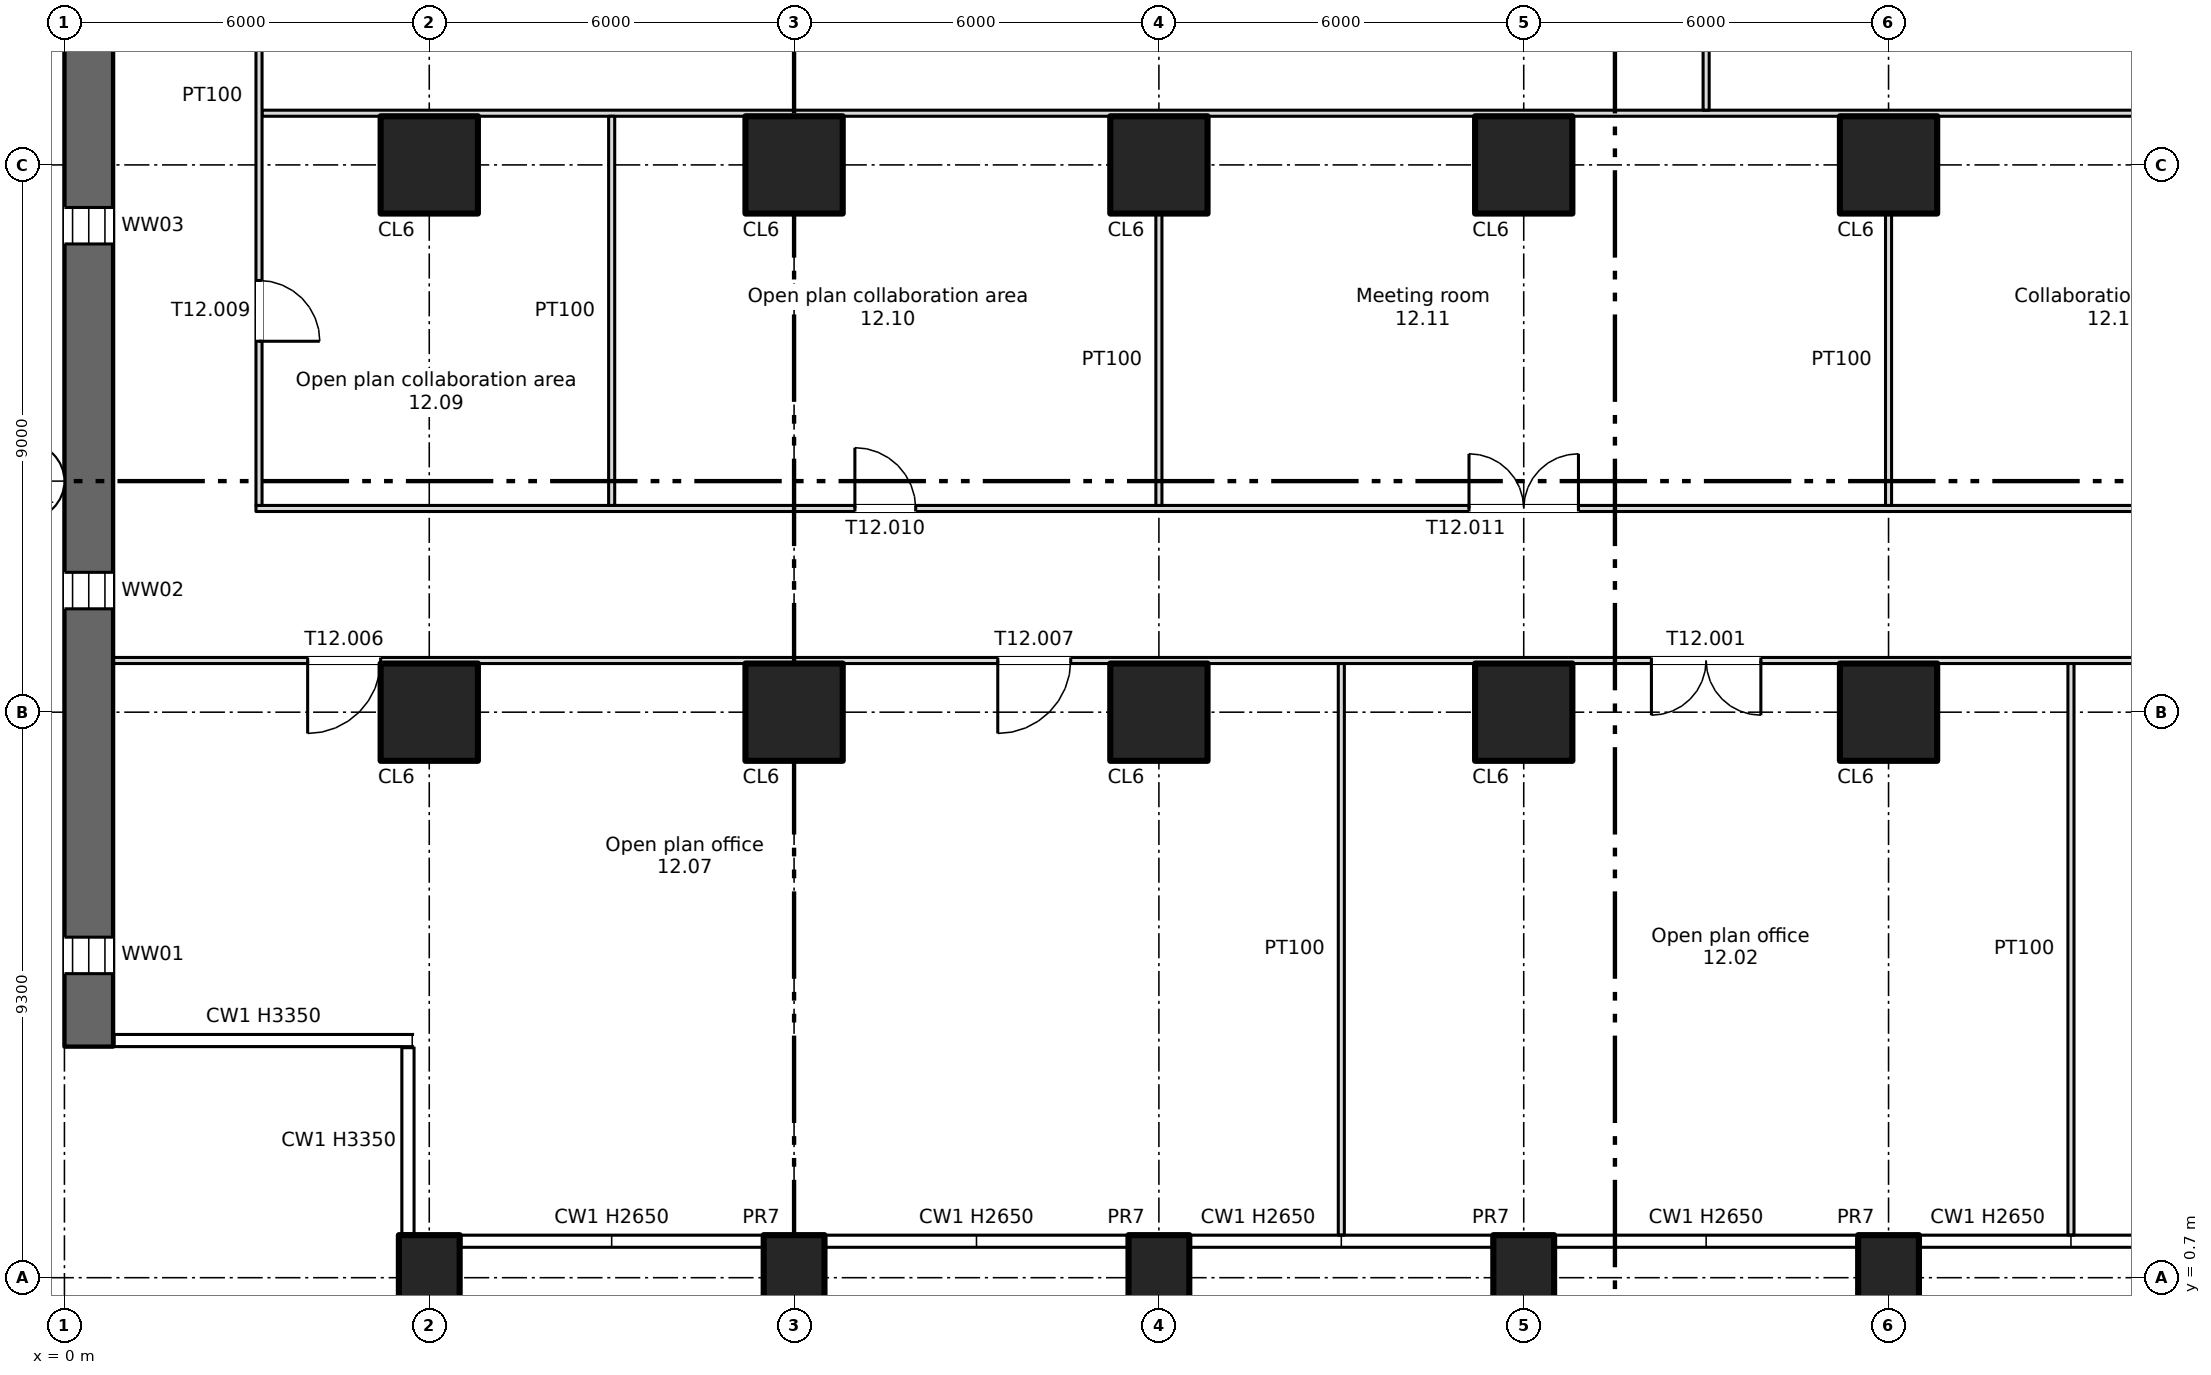
"""IFC4 building model, lengths in metres.
Left out: names, types, materials, properties, quantities, classifications, styles, units other than length and angle.
Written with IfcOpenShell. Run it as: python <this file> out.ifc"""

import sys

from ifc_helpers import new_model, si_unit, direction, frame, frame_2d, origin, origin_2d, place, context, subcontext, project, spatial, rectangle, extrude, element, fill, save


model = new_model("IFC4")
c1 = context("Model", 3, precision=1e-05, world=origin(), true_north=direction((0.0, 1.0)))
c2 = subcontext(c1, "Body", "Model", "MODEL_VIEW")
j1 = project(units=[si_unit("LENGTHUNIT", "METRE"), si_unit("PLANEANGLEUNIT", "RADIAN")], contexts=[c1])
p1 = place(None, origin())
s1 = spatial("IfcSite", under=j1, at=p1, CompositionType="ELEMENT")
p2 = place(p1, origin())
s2 = spatial("IfcBuilding", under=s1, at=p2, CompositionType="ELEMENT")
p3 = place(p2, frame((0.0, 0.0, 63.75)))
s3 = spatial("IfcBuildingStorey", under=s2, at=p3, CompositionType="ELEMENT", Elevation=63.75)
for number, where, z_axis, x_axis in (
    (1, (6.0, 0.7, -0.4), (0.0, 0.0, 1.0), (1.0, 0.0, 0.0)),
    (2, (12.0, 0.7, -0.4), (0.0, 0.0, 1.0), (1.0, 0.0, 0.0)),
    (3, (18.0, 0.7, -0.4), (0.0, 0.0, 1.0), (1.0, 0.0, 0.0)),
    (4, (24.0, 0.7, -0.4), (0.0, 0.0, 1.0), (1.0, 0.0, 0.0)),
    (5, (30.0, 0.7, -0.4), (0.0, 0.0, 1.0), (1.0, 0.0, 0.0)),
):
    element("IfcColumn", number, at=place(p3, frame(where, z_axis=z_axis, x_axis=x_axis)), inside=s3, PredefinedType="COLUMN", context=c2, shape_type="SweptSolid", body=[
        extrude(rectangle(XDim=1.0, YDim=1.4, at=origin_2d()), origin(), (0.0, 0.0, 1.0), 3.75),
    ])
for number, where, z_axis, x_axis in (
    (6, (6.0, 10.0, 0.0), (0.0, 0.0, 1.0), (1.0, 0.0, 0.0)),
    (7, (6.0, 19.0, 0.0), (0.0, 0.0, 1.0), (1.0, 0.0, 0.0)),
    (8, (12.0, 10.0, 0.0), (0.0, 0.0, 1.0), (1.0, 0.0, 0.0)),
    (9, (12.0, 19.0, 0.0), (0.0, 0.0, 1.0), (1.0, 0.0, 0.0)),
    (10, (18.0, 10.0, 0.0), (0.0, 0.0, 1.0), (1.0, 0.0, 0.0)),
    (11, (18.0, 19.0, 0.0), (0.0, 0.0, 1.0), (1.0, 0.0, 0.0)),
    (12, (24.0, 10.0, 0.0), (0.0, 0.0, 1.0), (1.0, 0.0, 0.0)),
    (13, (24.0, 19.0, 0.0), (0.0, 0.0, 1.0), (1.0, 0.0, 0.0)),
    (14, (30.0, 10.0, 0.0), (0.0, 0.0, 1.0), (1.0, 0.0, 0.0)),
    (15, (30.0, 19.0, 0.0), (0.0, 0.0, 1.0), (1.0, 0.0, 0.0)),
):
    element("IfcColumn", number, at=place(p3, frame(where, z_axis=z_axis, x_axis=x_axis)), inside=s3, PredefinedType="COLUMN", context=c2, shape_type="SweptSolid", body=[
        extrude(rectangle(XDim=1.6, YDim=1.6, at=origin_2d()), origin(), (0.0, 0.0, 1.0), 3.35),
    ])
p4 = place(p3, frame((0.4, 4.5, 0.0), z_axis=(0.0, 0.0, 1.0), x_axis=(0.0, 1.0, 0.0)))
e16 = element("IfcWall", 16, at=p4, inside=s3, PredefinedType="SHEAR", context=c2, shape_type="SweptSolid", body=[
    extrude(rectangle(XDim=37.0, YDim=0.8, at=frame_2d((18.5, 0.0))), origin(), (0.0, 0.0, 1.0), 3.35),
])
p5 = place(p4, frame((1.2, 0.0, 0.6)))
e17 = element("IfcOpeningElement", 17, at=p5, cuts=e16, PredefinedType="OPENING", context=c2, shape_type="SweptSolid", body=[
    extrude(rectangle(XDim=0.6, YDim=2.4, at=frame_2d((0.3, 1.2))), frame((0.0, 0.41, 0.0), z_axis=(0.0, -1.0, 0.0), x_axis=(1.0, 0.0, 0.0)), (0.0, 0.0, 1.0), 0.82),
])
p6 = place(p4, frame((7.2, 0.0, 0.6)))
e18 = element("IfcOpeningElement", 18, at=p6, cuts=e16, PredefinedType="OPENING", context=c2, shape_type="SweptSolid", body=[
    extrude(rectangle(XDim=0.6, YDim=2.4, at=frame_2d((0.3, 1.2))), frame((0.0, 0.41, 0.0), z_axis=(0.0, -1.0, 0.0), x_axis=(1.0, 0.0, 0.0)), (0.0, 0.0, 1.0), 0.82),
])
p7 = place(p4, frame((13.2, 0.0, 0.6)))
e19 = element("IfcOpeningElement", 19, at=p7, cuts=e16, PredefinedType="OPENING", context=c2, shape_type="SweptSolid", body=[
    extrude(rectangle(XDim=0.6, YDim=2.4, at=frame_2d((0.3, 1.2))), frame((0.0, 0.41, 0.0), z_axis=(0.0, -1.0, 0.0), x_axis=(1.0, 0.0, 0.0)), (0.0, 0.0, 1.0), 0.82),
])
p8 = place(p4, frame((19.2, 0.0, 0.6)))
e20 = element("IfcOpeningElement", 20, at=p8, cuts=e16, PredefinedType="OPENING", context=c2, shape_type="SweptSolid", body=[
    extrude(rectangle(XDim=0.6, YDim=2.4, at=frame_2d((0.3, 1.2))), frame((0.0, 0.41, 0.0), z_axis=(0.0, -1.0, 0.0), x_axis=(1.0, 0.0, 0.0)), (0.0, 0.0, 1.0), 0.82),
])
p9 = place(p4, frame((25.2, 0.0, 0.6)))
e21 = element("IfcOpeningElement", 21, at=p9, cuts=e16, PredefinedType="OPENING", context=c2, shape_type="SweptSolid", body=[
    extrude(rectangle(XDim=0.6, YDim=2.4, at=frame_2d((0.3, 1.2))), frame((0.0, 0.41, 0.0), z_axis=(0.0, -1.0, 0.0), x_axis=(1.0, 0.0, 0.0)), (0.0, 0.0, 1.0), 0.82),
])
p10 = place(p4, frame((31.2, 0.0, 0.6)))
e22 = element("IfcOpeningElement", 22, at=p10, cuts=e16, PredefinedType="OPENING", context=c2, shape_type="SweptSolid", body=[
    extrude(rectangle(XDim=0.6, YDim=2.4, at=frame_2d((0.3, 1.2))), frame((0.0, 0.41, 0.0), z_axis=(0.0, -1.0, 0.0), x_axis=(1.0, 0.0, 0.0)), (0.0, 0.0, 1.0), 0.82),
])
p11 = place(p3, frame((0.8, 10.85, 0.0), z_axis=(0.0, 0.0, 1.0), x_axis=(1.0, 0.0, 0.0)))
e23 = element("IfcWall", 23, at=p11, inside=s3, PredefinedType="PARTITIONING", context=c2, shape_type="SweptSolid", body=[
    extrude(rectangle(XDim=76.4, YDim=0.1, at=frame_2d((38.2, 0.0))), origin(), (0.0, 0.0, 1.0), 3.35),
])
p12 = place(p11, frame((25.3, 0.0, 0.0)))
e24 = element("IfcOpeningElement", 24, at=p12, cuts=e23, PredefinedType="OPENING", context=c2, shape_type="SweptSolid", body=[
    extrude(rectangle(XDim=1.8, YDim=2.1, at=frame_2d((0.9, 1.05))), frame((0.0, 0.06, 0.0), z_axis=(0.0, -1.0, 0.0), x_axis=(1.0, 0.0, 0.0)), (0.0, 0.0, 1.0), 0.12),
])
p13 = place(p11, frame((37.3, 0.0, 0.0)))
e25 = element("IfcOpeningElement", 25, at=p13, cuts=e23, PredefinedType="OPENING", context=c2, shape_type="SweptSolid", body=[
    extrude(rectangle(XDim=1.8, YDim=2.1, at=frame_2d((0.9, 1.05))), frame((0.0, 0.06, 0.0), z_axis=(0.0, -1.0, 0.0), x_axis=(1.0, 0.0, 0.0)), (0.0, 0.0, 1.0), 0.12),
])
p14 = place(p11, frame((48.2, 0.0, 0.0)))
e26 = element("IfcOpeningElement", 26, at=p14, cuts=e23, PredefinedType="OPENING", context=c2, shape_type="SweptSolid", body=[
    extrude(rectangle(XDim=1.0, YDim=2.1, at=frame_2d((0.5, 1.05))), frame((0.0, 0.06, 0.0), z_axis=(0.0, -1.0, 0.0), x_axis=(1.0, 0.0, 0.0)), (0.0, 0.0, 1.0), 0.12),
])
p15 = place(p11, frame((54.2, 0.0, 0.0)))
e27 = element("IfcOpeningElement", 27, at=p15, cuts=e23, PredefinedType="OPENING", context=c2, shape_type="SweptSolid", body=[
    extrude(rectangle(XDim=1.0, YDim=2.1, at=frame_2d((0.5, 1.05))), frame((0.0, 0.06, 0.0), z_axis=(0.0, -1.0, 0.0), x_axis=(1.0, 0.0, 0.0)), (0.0, 0.0, 1.0), 0.12),
])
p16 = place(p11, frame((61.3, 0.0, 0.0)))
e28 = element("IfcOpeningElement", 28, at=p16, cuts=e23, PredefinedType="OPENING", context=c2, shape_type="SweptSolid", body=[
    extrude(rectangle(XDim=1.8, YDim=2.1, at=frame_2d((0.9, 1.05))), frame((0.0, 0.06, 0.0), z_axis=(0.0, -1.0, 0.0), x_axis=(1.0, 0.0, 0.0)), (0.0, 0.0, 1.0), 0.12),
])
p17 = place(p11, frame((3.2, 0.0, 0.0)))
e29 = element("IfcOpeningElement", 29, at=p17, cuts=e23, PredefinedType="OPENING", context=c2, shape_type="SweptSolid", body=[
    extrude(rectangle(XDim=1.2, YDim=2.1, at=frame_2d((0.6, 1.05))), frame((0.0, 0.06, 0.0), z_axis=(0.0, -1.0, 0.0), x_axis=(1.0, 0.0, 0.0)), (0.0, 0.0, 1.0), 0.12),
])
p18 = place(p11, frame((14.55, 0.0, 0.0)))
e30 = element("IfcOpeningElement", 30, at=p18, cuts=e23, PredefinedType="OPENING", context=c2, shape_type="SweptSolid", body=[
    extrude(rectangle(XDim=1.2, YDim=2.1, at=frame_2d((0.6, 1.05))), frame((0.0, 0.06, 0.0), z_axis=(0.0, -1.0, 0.0), x_axis=(1.0, 0.0, 0.0)), (0.0, 0.0, 1.0), 0.12),
])
p19 = place(p11, frame((72.15, 0.0, 0.0)))
e31 = element("IfcOpeningElement", 31, at=p19, cuts=e23, PredefinedType="OPENING", context=c2, shape_type="SweptSolid", body=[
    extrude(rectangle(XDim=1.8, YDim=2.1, at=frame_2d((0.9, 1.05))), frame((0.0, 0.06, 0.0), z_axis=(0.0, -1.0, 0.0), x_axis=(1.0, 0.0, 0.0)), (0.0, 0.0, 1.0), 0.12),
])
p20 = place(p3, frame((3.15, 13.35, 0.0), z_axis=(0.0, 0.0, 1.0), x_axis=(1.0, 0.0, 0.0)))
e32 = element("IfcWall", 32, at=p20, inside=s3, PredefinedType="PARTITIONING", context=c2, shape_type="SweptSolid", body=[
    extrude(rectangle(XDim=71.7, YDim=0.1, at=frame_2d((35.85, 0.0))), origin(), (0.0, 0.0, 1.0), 3.35),
])
p21 = place(p20, frame((9.85, 0.0, 0.0)))
e33 = element("IfcOpeningElement", 33, at=p21, cuts=e32, PredefinedType="OPENING", context=c2, shape_type="SweptSolid", body=[
    extrude(rectangle(XDim=1.0, YDim=2.1, at=frame_2d((0.5, 1.05))), frame((0.0, 0.06, 0.0), z_axis=(0.0, -1.0, 0.0), x_axis=(1.0, 0.0, 0.0)), (0.0, 0.0, 1.0), 0.12),
])
p22 = place(p20, frame((19.95, 0.0, 0.0)))
e34 = element("IfcOpeningElement", 34, at=p22, cuts=e32, PredefinedType="OPENING", context=c2, shape_type="SweptSolid", body=[
    extrude(rectangle(XDim=1.8, YDim=2.1, at=frame_2d((0.9, 1.05))), frame((0.0, 0.06, 0.0), z_axis=(0.0, -1.0, 0.0), x_axis=(1.0, 0.0, 0.0)), (0.0, 0.0, 1.0), 0.12),
])
p23 = place(p20, frame((31.95, 0.0, 0.0)))
e35 = element("IfcOpeningElement", 35, at=p23, cuts=e32, PredefinedType="OPENING", context=c2, shape_type="SweptSolid", body=[
    extrude(rectangle(XDim=1.8, YDim=2.1, at=frame_2d((0.9, 1.05))), frame((0.0, 0.06, 0.0), z_axis=(0.0, -1.0, 0.0), x_axis=(1.0, 0.0, 0.0)), (0.0, 0.0, 1.0), 0.12),
])
p24 = place(p20, frame((43.95, 0.0, 0.0)))
e36 = element("IfcOpeningElement", 36, at=p24, cuts=e32, PredefinedType="OPENING", context=c2, shape_type="SweptSolid", body=[
    extrude(rectangle(XDim=1.8, YDim=2.1, at=frame_2d((0.9, 1.05))), frame((0.0, 0.06, 0.0), z_axis=(0.0, -1.0, 0.0), x_axis=(1.0, 0.0, 0.0)), (0.0, 0.0, 1.0), 0.12),
])
p25 = place(p20, frame((55.95, 0.0, 0.0)))
e37 = element("IfcOpeningElement", 37, at=p25, cuts=e32, PredefinedType="OPENING", context=c2, shape_type="SweptSolid", body=[
    extrude(rectangle(XDim=1.8, YDim=2.1, at=frame_2d((0.9, 1.05))), frame((0.0, 0.06, 0.0), z_axis=(0.0, -1.0, 0.0), x_axis=(1.0, 0.0, 0.0)), (0.0, 0.0, 1.0), 0.12),
])
p26 = place(p20, frame((66.75, 0.0, 0.0)))
e38 = element("IfcOpeningElement", 38, at=p26, cuts=e32, PredefinedType="OPENING", context=c2, shape_type="SweptSolid", body=[
    extrude(rectangle(XDim=1.0, YDim=2.1, at=frame_2d((0.5, 1.05))), frame((0.0, 0.06, 0.0), z_axis=(0.0, -1.0, 0.0), x_axis=(1.0, 0.0, 0.0)), (0.0, 0.0, 1.0), 0.12),
])
p27 = place(p3, frame((3.25, 19.85, 0.0), z_axis=(0.0, 0.0, 1.0), x_axis=(1.0, 0.0, 0.0)))
e39 = element("IfcWall", 39, at=p27, inside=s3, PredefinedType="PARTITIONING", context=c2, shape_type="SweptSolid", body=[
    extrude(rectangle(XDim=71.5, YDim=0.1, at=frame_2d((35.75, 0.0))), origin(), (0.0, 0.0, 1.0), 3.35),
])
p28 = place(p3, frame((3.2, 13.4, 0.0), z_axis=(0.0, 0.0, 1.0), x_axis=(0.0, 1.0, 0.0)))
e40 = element("IfcWall", 40, at=p28, inside=s3, PredefinedType="PARTITIONING", context=c2, shape_type="SweptSolid", body=[
    extrude(rectangle(XDim=11.55, YDim=0.1, at=frame_2d((5.775, 0.0))), origin(), (0.0, 0.0, 1.0), 3.35),
])
p29 = place(p28, frame((2.7, 0.0, 0.0)))
e41 = element("IfcOpeningElement", 41, at=p29, cuts=e40, PredefinedType="OPENING", context=c2, shape_type="SweptSolid", body=[
    extrude(rectangle(XDim=1.0, YDim=2.1, at=frame_2d((0.5, 1.05))), frame((0.0, 0.06, 0.0), z_axis=(0.0, -1.0, 0.0), x_axis=(1.0, 0.0, 0.0)), (0.0, 0.0, 1.0), 0.12),
])
p30 = place(p3, frame((9.0, 13.4, 0.0), z_axis=(0.0, 0.0, 1.0), x_axis=(0.0, 1.0, 0.0)))
e42 = element("IfcWall", 42, at=p30, inside=s3, PredefinedType="PARTITIONING", context=c2, shape_type="SweptSolid", body=[
    extrude(rectangle(XDim=6.4, YDim=0.1, at=frame_2d((3.2, 0.0))), origin(), (0.0, 0.0, 1.0), 3.35),
])
p31 = place(p3, frame((18.0, 13.4, 0.0), z_axis=(0.0, 0.0, 1.0), x_axis=(0.0, 1.0, 0.0)))
e43 = element("IfcWall", 43, at=p31, inside=s3, PredefinedType="PARTITIONING", context=c2, shape_type="SweptSolid", body=[
    extrude(rectangle(XDim=4.8, YDim=0.1, at=frame_2d((2.4, 0.0))), origin(), (0.0, 0.0, 1.0), 3.35),
])
p32 = place(p3, frame((21.0, 1.4, 0.0), z_axis=(0.0, 0.0, 1.0), x_axis=(0.0, 1.0, 0.0)))
e44 = element("IfcWall", 44, at=p32, inside=s3, PredefinedType="PARTITIONING", context=c2, shape_type="SweptSolid", body=[
    extrude(rectangle(XDim=9.4, YDim=0.1, at=frame_2d((4.7, 0.0))), origin(), (0.0, 0.0, 1.0), 3.35),
])
p33 = place(p3, frame((27.0, 19.9, 0.0), z_axis=(0.0, 0.0, 1.0), x_axis=(0.0, 1.0, 0.0)))
e45 = element("IfcWall", 45, at=p33, inside=s3, PredefinedType="PARTITIONING", context=c2, shape_type="SweptSolid", body=[
    extrude(rectangle(XDim=5.05, YDim=0.1, at=frame_2d((2.525, 0.0))), origin(), (0.0, 0.0, 1.0), 3.35),
])
p34 = place(p3, frame((30.0, 13.4, 0.0), z_axis=(0.0, 0.0, 1.0), x_axis=(0.0, 1.0, 0.0)))
e46 = element("IfcWall", 46, at=p34, inside=s3, PredefinedType="PARTITIONING", context=c2, shape_type="SweptSolid", body=[
    extrude(rectangle(XDim=4.8, YDim=0.1, at=frame_2d((2.4, 0.0))), origin(), (0.0, 0.0, 1.0), 3.35),
])
p35 = place(p3, frame((33.0, 1.4, 0.0), z_axis=(0.0, 0.0, 1.0), x_axis=(0.0, 1.0, 0.0)))
e47 = element("IfcWall", 47, at=p35, inside=s3, PredefinedType="PARTITIONING", context=c2, shape_type="SweptSolid", body=[
    extrude(rectangle(XDim=9.4, YDim=0.1, at=frame_2d((4.7, 0.0))), origin(), (0.0, 0.0, 1.0), 3.35),
])
p36 = place(p5, origin())
e48 = element("IfcWindow", 48, at=p36, inside=s3, PartitioningType="SINGLE_PANEL", PredefinedType="WINDOW", context=c2, shape_type="SweptSolid", body=[
    extrude(rectangle(XDim=0.6, YDim=2.4, at=frame_2d((0.3, 1.2))), frame((0.0, 0.03, 0.0), z_axis=(0.0, -1.0, 0.0), x_axis=(1.0, 0.0, 0.0)), (0.0, 0.0, 1.0), 0.06),
])
fill(e17, e48)
p37 = place(p6, origin())
e49 = element("IfcWindow", 49, at=p37, inside=s3, PartitioningType="SINGLE_PANEL", PredefinedType="WINDOW", context=c2, shape_type="SweptSolid", body=[
    extrude(rectangle(XDim=0.6, YDim=2.4, at=frame_2d((0.3, 1.2))), frame((0.0, 0.03, 0.0), z_axis=(0.0, -1.0, 0.0), x_axis=(1.0, 0.0, 0.0)), (0.0, 0.0, 1.0), 0.06),
])
fill(e18, e49)
p38 = place(p7, origin())
e50 = element("IfcWindow", 50, at=p38, inside=s3, PartitioningType="SINGLE_PANEL", PredefinedType="WINDOW", context=c2, shape_type="SweptSolid", body=[
    extrude(rectangle(XDim=0.6, YDim=2.4, at=frame_2d((0.3, 1.2))), frame((0.0, 0.03, 0.0), z_axis=(0.0, -1.0, 0.0), x_axis=(1.0, 0.0, 0.0)), (0.0, 0.0, 1.0), 0.06),
])
fill(e19, e50)
p39 = place(p12, origin())
e51 = element("IfcDoor", 51, at=p39, inside=s3, OperationType="DOUBLE_DOOR_SINGLE_SWING", PredefinedType="DOOR", context=c2, shape_type="SweptSolid", body=[
    extrude(rectangle(XDim=1.8, YDim=2.1, at=frame_2d((0.9, 1.05))), frame((0.0, 0.025, 0.0), z_axis=(0.0, -1.0, 0.0), x_axis=(1.0, 0.0, 0.0)), (0.0, 0.0, 1.0), 0.05),
])
fill(e24, e51)
p40 = place(p17, origin())
e52 = element("IfcDoor", 52, at=p40, inside=s3, OperationType="SINGLE_SWING_LEFT", PredefinedType="DOOR", context=c2, shape_type="SweptSolid", body=[
    extrude(rectangle(XDim=1.2, YDim=2.1, at=frame_2d((0.6, 1.05))), frame((0.0, 0.025, 0.0), z_axis=(0.0, -1.0, 0.0), x_axis=(1.0, 0.0, 0.0)), (0.0, 0.0, 1.0), 0.05),
])
fill(e29, e52)
p41 = place(p18, origin())
e53 = element("IfcDoor", 53, at=p41, inside=s3, OperationType="SINGLE_SWING_LEFT", PredefinedType="DOOR", context=c2, shape_type="SweptSolid", body=[
    extrude(rectangle(XDim=1.2, YDim=2.1, at=frame_2d((0.6, 1.05))), frame((0.0, 0.025, 0.0), z_axis=(0.0, -1.0, 0.0), x_axis=(1.0, 0.0, 0.0)), (0.0, 0.0, 1.0), 0.05),
])
fill(e30, e53)
p42 = place(p29, origin())
e54 = element("IfcDoor", 54, at=p42, inside=s3, OperationType="SINGLE_SWING_LEFT", PredefinedType="DOOR", context=c2, shape_type="SweptSolid", body=[
    extrude(rectangle(XDim=1.0, YDim=2.1, at=frame_2d((0.5, 1.05))), frame((0.0, 0.025, 0.0), z_axis=(0.0, -1.0, 0.0), x_axis=(1.0, 0.0, 0.0)), (0.0, 0.0, 1.0), 0.05),
])
fill(e41, e54)
p43 = place(p21, origin())
e55 = element("IfcDoor", 55, at=p43, inside=s3, OperationType="SINGLE_SWING_LEFT", PredefinedType="DOOR", context=c2, shape_type="SweptSolid", body=[
    extrude(rectangle(XDim=1.0, YDim=2.1, at=frame_2d((0.5, 1.05))), frame((0.0, 0.025, 0.0), z_axis=(0.0, -1.0, 0.0), x_axis=(1.0, 0.0, 0.0)), (0.0, 0.0, 1.0), 0.05),
])
fill(e33, e55)
p44 = place(p22, origin())
e56 = element("IfcDoor", 56, at=p44, inside=s3, OperationType="DOUBLE_DOOR_SINGLE_SWING", PredefinedType="DOOR", context=c2, shape_type="SweptSolid", body=[
    extrude(rectangle(XDim=1.8, YDim=2.1, at=frame_2d((0.9, 1.05))), frame((0.0, 0.025, 0.0), z_axis=(0.0, -1.0, 0.0), x_axis=(1.0, 0.0, 0.0)), (0.0, 0.0, 1.0), 0.05),
])
fill(e34, e56)
save(model, sys.argv[1])
